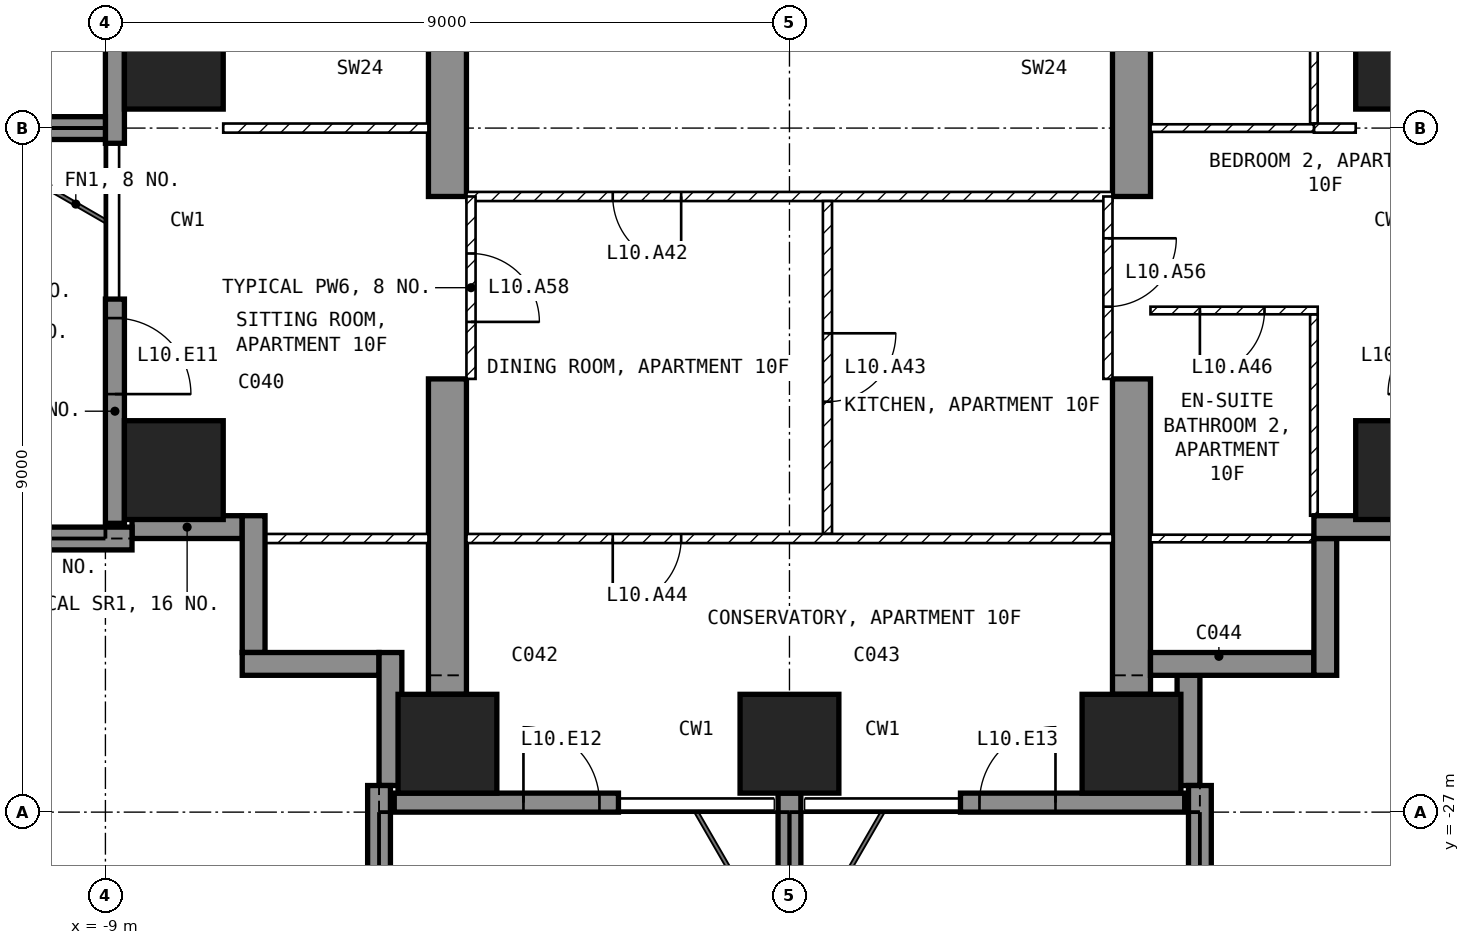
"""IFC4 building model, lengths in metres.
Left out: names, types, materials, properties, quantities, classifications, styles, units other than length and angle.
Written with IfcOpenShell. Run it as: python <this file> out.ifc"""

import sys

from ifc_helpers import new_model, si_unit, direction, frame, frame_2d, origin, origin_2d, place, context, subcontext, project, spatial, polyline, rectangle, outline, extrude, element, fill, save


model = new_model("IFC4")
c1 = context("Model", 3, precision=1e-05, world=origin(), true_north=direction((0.0, 1.0)))
c2 = subcontext(c1, "Body", "Model", "MODEL_VIEW")
j1 = project(units=[si_unit("LENGTHUNIT", "METRE"), si_unit("PLANEANGLEUNIT", "RADIAN")], contexts=[c1])
p1 = place(None, origin())
s1 = spatial("IfcSite", under=j1, at=p1, CompositionType="ELEMENT")
p2 = place(p1, origin())
s2 = spatial("IfcBuilding", under=s1, at=p2, CompositionType="ELEMENT")
p3 = place(p2, frame((0.0, 0.0, 54.0)))
s3 = spatial("IfcBuildingStorey", under=s2, at=p3, CompositionType="ELEMENT", Elevation=54.0)
for number, where, z_axis, x_axis in (
    (1, (-8.1, -22.5, -0.25), (0.0, 0.0, 1.0), (1.0, 0.0, 0.0)),
    (2, (-8.1, -17.1, -0.25), (0.0, 0.0, 1.0), (1.0, 0.0, 0.0)),
    (3, (-4.5, -26.1, -0.25), (0.0, 0.0, 1.0), (1.0, 0.0, 0.0)),
    (4, (0.0, -26.1, -0.25), (0.0, 0.0, 1.0), (1.0, 0.0, 0.0)),
    (5, (4.5, -26.1, -0.25), (0.0, 0.0, 1.0), (1.0, 0.0, 0.0)),
    (6, (8.1, -22.5, -0.25), (0.0, 0.0, 1.0), (1.0, 0.0, 0.0)),
    (7, (8.1, -17.1, -0.25), (0.0, 0.0, 1.0), (1.0, 0.0, 0.0)),
):
    element("IfcColumn", number, at=place(p3, frame(where, z_axis=z_axis, x_axis=x_axis)), inside=s3, PredefinedType="COLUMN", context=c2, shape_type="SweptSolid", body=[
        extrude(rectangle(XDim=1.3, YDim=1.3, at=origin_2d()), origin(), (0.0, 0.0, 1.0), 3.5),
    ])
for number, where, z_axis, x_axis in (
    (8, (-4.75, -25.45, -0.25), (1.0, 0.0, 0.0), (0.0, 1.0, 0.0)),
    (9, (4.25, -25.45, -0.25), (1.0, 0.0, 0.0), (0.0, 1.0, 0.0)),
):
    element("IfcWall", number, at=place(p3, frame(where, z_axis=z_axis, x_axis=x_axis)), inside=s3, PredefinedType="SHEAR", context=c2, shape_type="SweptSolid", body=[
        extrude(outline(polyline([(0.0, 0.0), (4.15, 0.0), (4.15, 2.65), (6.55, 2.65), (6.55, 0.0), (11.95, 0.0), (11.95, 2.65), (14.35, 2.65), (14.35, 0.0), (16.45, 0.0), (16.45, 3.5), (0.0, 3.5), (0.0, 0.0)])), origin(), (0.0, 0.0, 1.0), 0.5),
    ])
p4 = place(p3, frame((-8.875, -14.65, 0.0), z_axis=(0.0, 0.0, 1.0), x_axis=(0.0, -1.0, 0.0)))
e10 = element("IfcWall", 10, at=p4, inside=s3, PredefinedType="SOLIDWALL", context=c2, shape_type="SweptSolid", body=[
    extrude(rectangle(XDim=3.55, YDim=0.25, at=frame_2d((1.775, 0.0))), origin(), (0.0, 0.0, 1.0), 3.25),
])
p5 = place(p4, frame((0.25, 0.0, 0.0)))
e11 = element("IfcOpeningElement", 11, at=p5, cuts=e10, PredefinedType="OPENING", context=c2, shape_type="SweptSolid", body=[
    extrude(rectangle(XDim=1.2, YDim=2.4, at=frame_2d((0.6, 1.2))), frame((0.0, 0.135, 0.0), z_axis=(0.0, -1.0, 0.0), x_axis=(1.0, 0.0, 0.0)), (0.0, 0.0, 1.0), 0.27),
])
p6 = place(p3, frame((-8.875, -20.25, 0.0), z_axis=(0.0, 0.0, 1.0), x_axis=(0.0, -1.0, 0.0)))
e12 = element("IfcWall", 12, at=p6, inside=s3, PredefinedType="SOLIDWALL", context=c2, shape_type="SweptSolid", body=[
    extrude(rectangle(XDim=2.95, YDim=0.25, at=frame_2d((1.475, 0.0))), origin(), (0.0, 0.0, 1.0), 3.25),
])
p7 = place(p6, frame((0.25, 0.0, 0.0)))
e13 = element("IfcOpeningElement", 13, at=p7, cuts=e12, PredefinedType="OPENING", context=c2, shape_type="SweptSolid", body=[
    extrude(rectangle(XDim=1.0, YDim=2.4, at=frame_2d((0.5, 1.2))), frame((0.0, 0.135, 0.0), z_axis=(0.0, -1.0, 0.0), x_axis=(1.0, 0.0, 0.0)), (0.0, 0.0, 1.0), 0.27),
])
p8 = place(p3, frame((-5.2, -26.875, 0.0), z_axis=(0.0, 0.0, 1.0), x_axis=(1.0, 0.0, 0.0)))
e14 = element("IfcWall", 14, at=p8, inside=s3, PredefinedType="SOLIDWALL", context=c2, shape_type="SweptSolid", body=[
    extrude(rectangle(XDim=2.95, YDim=0.25, at=frame_2d((1.475, 0.0))), origin(), (0.0, 0.0, 1.0), 3.25),
])
p9 = place(p8, frame((1.7, 0.0, 0.0)))
e15 = element("IfcOpeningElement", 15, at=p9, cuts=e14, PredefinedType="OPENING", context=c2, shape_type="SweptSolid", body=[
    extrude(rectangle(XDim=1.0, YDim=2.4, at=frame_2d((0.5, 1.2))), frame((0.0, 0.135, 0.0), z_axis=(0.0, -1.0, 0.0), x_axis=(1.0, 0.0, 0.0)), (0.0, 0.0, 1.0), 0.27),
])
p10 = place(p3, frame((2.25, -26.875, 0.0), z_axis=(0.0, 0.0, 1.0), x_axis=(1.0, 0.0, 0.0)))
e16 = element("IfcWall", 16, at=p10, inside=s3, PredefinedType="SOLIDWALL", context=c2, shape_type="SweptSolid", body=[
    extrude(rectangle(XDim=2.95, YDim=0.25, at=frame_2d((1.475, 0.0))), origin(), (0.0, 0.0, 1.0), 3.25),
])
p11 = place(p10, frame((0.25, 0.0, 0.0)))
e17 = element("IfcOpeningElement", 17, at=p11, cuts=e16, PredefinedType="OPENING", context=c2, shape_type="SweptSolid", body=[
    extrude(rectangle(XDim=1.0, YDim=2.4, at=frame_2d((0.5, 1.2))), frame((0.0, 0.135, 0.0), z_axis=(0.0, -1.0, 0.0), x_axis=(1.0, 0.0, 0.0)), (0.0, 0.0, 1.0), 0.27),
])
p12 = place(p3, frame((5.25, -26.65, 0.0), z_axis=(0.0, 0.0, 1.0), x_axis=(0.0, 1.0, 0.0)))
e18 = element("IfcWall", 18, at=p12, inside=s3, PredefinedType="SOLIDWALL", context=c2, shape_type="SweptSolid", body=[
    extrude(rectangle(XDim=1.45, YDim=0.3, at=frame_2d((0.725, 0.0))), origin(), (0.0, 0.0, 1.0), 3.25),
])
p13 = place(p3, frame((4.75, -25.05, 0.0), z_axis=(0.0, 0.0, 1.0), x_axis=(1.0, 0.0, 0.0)))
e19 = element("IfcWall", 19, at=p13, inside=s3, PredefinedType="SOLIDWALL", context=c2, shape_type="SweptSolid", body=[
    extrude(rectangle(XDim=2.15, YDim=0.3, at=frame_2d((1.075, 0.0))), origin(), (0.0, 0.0, 1.0), 3.25),
])
p14 = place(p3, frame((7.05, -25.2, 0.0), z_axis=(0.0, 0.0, 1.0), x_axis=(0.0, 1.0, 0.0)))
e20 = element("IfcWall", 20, at=p14, inside=s3, PredefinedType="SOLIDWALL", context=c2, shape_type="SweptSolid", body=[
    extrude(rectangle(XDim=1.8, YDim=0.3, at=frame_2d((0.9, 0.0))), origin(), (0.0, 0.0, 1.0), 3.25),
])
p15 = place(p3, frame((6.9, -23.25, 0.0), z_axis=(0.0, 0.0, 1.0), x_axis=(1.0, 0.0, 0.0)))
e21 = element("IfcWall", 21, at=p15, inside=s3, PredefinedType="SOLIDWALL", context=c2, shape_type="SweptSolid", body=[
    extrude(rectangle(XDim=1.75, YDim=0.3, at=frame_2d((0.875, 0.0))), origin(), (0.0, 0.0, 1.0), 3.25),
])
p16 = place(p3, frame((-8.65, -23.25, 0.0), z_axis=(0.0, 0.0, 1.0), x_axis=(1.0, 0.0, 0.0)))
e22 = element("IfcWall", 22, at=p16, inside=s3, PredefinedType="SOLIDWALL", context=c2, shape_type="SweptSolid", body=[
    extrude(rectangle(XDim=1.45, YDim=0.3, at=frame_2d((0.725, 0.0))), origin(), (0.0, 0.0, 1.0), 3.25),
])
p17 = place(p3, frame((-7.05, -23.1, 0.0), z_axis=(0.0, 0.0, 1.0), x_axis=(0.0, -1.0, 0.0)))
e23 = element("IfcWall", 23, at=p17, inside=s3, PredefinedType="SOLIDWALL", context=c2, shape_type="SweptSolid", body=[
    extrude(rectangle(XDim=1.8, YDim=0.3, at=frame_2d((0.9, 0.0))), origin(), (0.0, 0.0, 1.0), 3.25),
])
p18 = place(p3, frame((-7.2, -25.05, 0.0), z_axis=(0.0, 0.0, 1.0), x_axis=(1.0, 0.0, 0.0)))
e24 = element("IfcWall", 24, at=p18, inside=s3, PredefinedType="SOLIDWALL", context=c2, shape_type="SweptSolid", body=[
    extrude(rectangle(XDim=1.8, YDim=0.3, at=frame_2d((0.9, 0.0))), origin(), (0.0, 0.0, 1.0), 3.25),
])
p19 = place(p3, frame((-5.25, -24.9, 0.0), z_axis=(0.0, 0.0, 1.0), x_axis=(0.0, -1.0, 0.0)))
e25 = element("IfcWall", 25, at=p19, inside=s3, PredefinedType="SOLIDWALL", context=c2, shape_type="SweptSolid", body=[
    extrude(rectangle(XDim=1.75, YDim=0.3, at=frame_2d((0.875, 0.0))), origin(), (0.0, 0.0, 1.0), 3.25),
])
p20 = place(p3, frame((-8.65, -23.4, 0.0), z_axis=(0.0, 0.0, 1.0), x_axis=(-1.0, 0.0, 0.0)))
e26 = element("IfcWall", 26, at=p20, inside=s3, PredefinedType="SOLIDWALL", context=c2, shape_type="SweptSolid", body=[
    extrude(rectangle(XDim=3.05, YDim=0.3, at=frame_2d((1.525, 0.0))), origin(), (0.0, 0.0, 1.0), 3.25),
])
p21 = place(p3, frame((-9.0, -18.0, 0.0), z_axis=(0.0, 0.0, 1.0), x_axis=(-1.0, 0.0, 0.0)))
e27 = element("IfcWall", 27, at=p21, inside=s3, PredefinedType="SOLIDWALL", context=c2, shape_type="SweptSolid", body=[
    extrude(rectangle(XDim=2.7, YDim=0.3, at=frame_2d((1.35, 0.0))), origin(), (0.0, 0.0, 1.0), 3.25),
])
p22 = place(p3, frame((-5.4, -26.65, 0.0), z_axis=(0.0, 0.0, 1.0), x_axis=(0.0, -1.0, 0.0)))
e28 = element("IfcWall", 28, at=p22, inside=s3, PredefinedType="SOLIDWALL", context=c2, shape_type="SweptSolid", body=[
    extrude(rectangle(XDim=3.05, YDim=0.3, at=frame_2d((1.525, 0.0))), origin(), (0.0, 0.0, 1.0), 3.25),
])
p23 = place(p3, frame((0.0, -26.75, 0.0), z_axis=(0.0, 0.0, 1.0), x_axis=(0.0, -1.0, 0.0)))
e29 = element("IfcWall", 29, at=p23, inside=s3, PredefinedType="SOLIDWALL", context=c2, shape_type="SweptSolid", body=[
    extrude(rectangle(XDim=2.95, YDim=0.3, at=frame_2d((1.475, 0.0))), origin(), (0.0, 0.0, 1.0), 3.25),
])
p24 = place(p3, frame((5.4, -26.65, 0.0), z_axis=(0.0, 0.0, 1.0), x_axis=(0.0, -1.0, 0.0)))
e30 = element("IfcWall", 30, at=p24, inside=s3, PredefinedType="SOLIDWALL", context=c2, shape_type="SweptSolid", body=[
    extrude(rectangle(XDim=3.05, YDim=0.3, at=frame_2d((1.525, 0.0))), origin(), (0.0, 0.0, 1.0), 3.25),
])
p25 = place(p3, frame((4.25, -18.9, 0.0), z_axis=(0.0, 0.0, 1.0), x_axis=(-1.0, 0.0, 0.0)))
e31 = element("IfcWall", 31, at=p25, inside=s3, PredefinedType="PARTITIONING", context=c2, shape_type="SweptSolid", body=[
    extrude(rectangle(XDim=8.5, YDim=0.12, at=frame_2d((4.25, 0.0))), origin(), (0.0, 0.0, 1.0), 3.25),
])
p26 = place(p25, frame((5.675, 0.0, 0.0)))
e32 = element("IfcOpeningElement", 32, at=p26, cuts=e31, PredefinedType="OPENING", context=c2, shape_type="SweptSolid", body=[
    extrude(rectangle(XDim=0.9, YDim=2.1, at=frame_2d((0.45, 1.05))), frame((0.0, 0.07, 0.0), z_axis=(0.0, -1.0, 0.0), x_axis=(1.0, 0.0, 0.0)), (0.0, 0.0, 1.0), 0.14),
])
p27 = place(p3, frame((0.5, -18.96, 0.0), z_axis=(0.0, 0.0, 1.0), x_axis=(0.0, -1.0, 0.0)))
e33 = element("IfcWall", 33, at=p27, inside=s3, PredefinedType="PARTITIONING", context=c2, shape_type="SweptSolid", body=[
    extrude(rectangle(XDim=4.38, YDim=0.12, at=frame_2d((2.19, 0.0))), origin(), (0.0, 0.0, 1.0), 3.25),
])
p28 = place(p27, frame((1.74, 0.0, 0.0)))
e34 = element("IfcOpeningElement", 34, at=p28, cuts=e33, PredefinedType="OPENING", context=c2, shape_type="SweptSolid", body=[
    extrude(rectangle(XDim=0.9, YDim=2.1, at=frame_2d((0.45, 1.05))), frame((0.0, 0.07, 0.0), z_axis=(0.0, -1.0, 0.0), x_axis=(1.0, 0.0, 0.0)), (0.0, 0.0, 1.0), 0.14),
])
p29 = place(p3, frame((4.25, -23.4, 0.0), z_axis=(0.0, 0.0, 1.0), x_axis=(-1.0, 0.0, 0.0)))
e35 = element("IfcWall", 35, at=p29, inside=s3, PredefinedType="PARTITIONING", context=c2, shape_type="SweptSolid", body=[
    extrude(rectangle(XDim=8.5, YDim=0.12, at=frame_2d((4.25, 0.0))), origin(), (0.0, 0.0, 1.0), 3.25),
])
p30 = place(p29, frame((5.675, 0.0, 0.0)))
e36 = element("IfcOpeningElement", 36, at=p30, cuts=e35, PredefinedType="OPENING", context=c2, shape_type="SweptSolid", body=[
    extrude(rectangle(XDim=0.9, YDim=2.1, at=frame_2d((0.45, 1.05))), frame((0.0, 0.07, 0.0), z_axis=(0.0, -1.0, 0.0), x_axis=(1.0, 0.0, 0.0)), (0.0, 0.0, 1.0), 0.14),
])
p31 = place(p3, frame((6.9, -17.94, 0.0), z_axis=(0.0, 0.0, 1.0), x_axis=(0.0, 1.0, 0.0)))
e37 = element("IfcWall", 37, at=p31, inside=s3, PredefinedType="PARTITIONING", context=c2, shape_type="SweptSolid", body=[
    extrude(rectangle(XDim=3.49, YDim=0.1, at=frame_2d((1.745, 0.0))), origin(), (0.0, 0.0, 1.0), 3.25),
])
p32 = place(p3, frame((7.45, -18.0, 0.0), z_axis=(0.0, 0.0, 1.0), x_axis=(-1.0, 0.0, 0.0)))
e38 = element("IfcWall", 38, at=p32, inside=s3, PredefinedType="PARTITIONING", context=c2, shape_type="SweptSolid", body=[
    extrude(rectangle(XDim=0.55, YDim=0.12, at=frame_2d((0.275, 0.0))), origin(), (0.0, 0.0, 1.0), 3.25),
])
p33 = place(p3, frame((6.9, -18.0, 0.0), z_axis=(0.0, 0.0, 1.0), x_axis=(-1.0, 0.0, 0.0)))
e39 = element("IfcWall", 39, at=p33, inside=s3, PredefinedType="PARTITIONING", context=c2, shape_type="SweptSolid", body=[
    extrude(rectangle(XDim=2.15, YDim=0.1, at=frame_2d((1.075, 0.0))), origin(), (0.0, 0.0, 1.0), 3.25),
])
p34 = place(p3, frame((6.9, -23.1, 0.0), z_axis=(0.0, 0.0, 1.0), x_axis=(0.0, 1.0, 0.0)))
e40 = element("IfcWall", 40, at=p34, inside=s3, PredefinedType="PARTITIONING", context=c2, shape_type="SweptSolid", body=[
    extrude(rectangle(XDim=2.65, YDim=0.1, at=frame_2d((1.325, 0.0))), origin(), (0.0, 0.0, 1.0), 3.25),
])
p35 = place(p3, frame((6.95, -20.4, 0.0), z_axis=(0.0, 0.0, 1.0), x_axis=(-1.0, 0.0, 0.0)))
e41 = element("IfcWall", 41, at=p35, inside=s3, PredefinedType="PARTITIONING", context=c2, shape_type="SweptSolid", body=[
    extrude(rectangle(XDim=2.2, YDim=0.1, at=frame_2d((1.1, 0.0))), origin(), (0.0, 0.0, 1.0), 3.25),
])
p36 = place(p35, frame((0.7, 0.0, 0.0)))
e42 = element("IfcOpeningElement", 42, at=p36, cuts=e41, PredefinedType="OPENING", context=c2, shape_type="SweptSolid", body=[
    extrude(rectangle(XDim=0.85, YDim=2.1, at=frame_2d((0.425, 1.05))), frame((0.0, 0.06, 0.0), z_axis=(0.0, -1.0, 0.0), x_axis=(1.0, 0.0, 0.0)), (0.0, 0.0, 1.0), 0.12),
])
p37 = place(p3, frame((7.12, -23.4, 0.0), z_axis=(0.0, 0.0, 1.0), x_axis=(-1.0, 0.0, 0.0)))
e43 = element("IfcWall", 43, at=p37, inside=s3, PredefinedType="PARTITIONING", context=c2, shape_type="SweptSolid", body=[
    extrude(rectangle(XDim=2.37, YDim=0.1, at=frame_2d((1.185, 0.0))), origin(), (0.0, 0.0, 1.0), 3.25),
])
p38 = place(p3, frame((-4.75, -18.0, 0.0), z_axis=(0.0, 0.0, 1.0), x_axis=(-1.0, 0.0, 0.0)))
e44 = element("IfcWall", 44, at=p38, inside=s3, PredefinedType="PARTITIONING", context=c2, shape_type="SweptSolid", body=[
    extrude(rectangle(XDim=2.7, YDim=0.12, at=frame_2d((1.35, 0.0))), origin(), (0.0, 0.0, 1.0), 3.25),
])
p39 = place(p3, frame((-4.75, -23.4, 0.0), z_axis=(0.0, 0.0, 1.0), x_axis=(-1.0, 0.0, 0.0)))
e45 = element("IfcWall", 45, at=p39, inside=s3, PredefinedType="PARTITIONING", context=c2, shape_type="SweptSolid", body=[
    extrude(rectangle(XDim=2.37, YDim=0.12, at=frame_2d((1.185, 0.0))), origin(), (0.0, 0.0, 1.0), 3.25),
])
p40 = place(p3, frame((4.19, -18.9, 0.0), z_axis=(0.0, 0.0, 1.0), x_axis=(0.0, -1.0, 0.0)))
e46 = element("IfcWall", 46, at=p40, inside=s3, PredefinedType="PARTITIONING", context=c2, shape_type="SweptSolid", body=[
    extrude(rectangle(XDim=2.4, YDim=0.12, at=frame_2d((1.2, 0.0))), origin(), (0.0, 0.0, 1.0), 2.4),
])
p41 = place(p40, frame((0.55, 0.0, 0.0)))
e47 = element("IfcOpeningElement", 47, at=p41, cuts=e46, PredefinedType="OPENING", context=c2, shape_type="SweptSolid", body=[
    extrude(rectangle(XDim=0.9, YDim=2.1, at=frame_2d((0.45, 1.05))), frame((0.0, 0.07, 0.0), z_axis=(0.0, -1.0, 0.0), x_axis=(1.0, 0.0, 0.0)), (0.0, 0.0, 1.0), 0.14),
])
p42 = place(p3, frame((-4.19, -18.9, 0.0), z_axis=(0.0, 0.0, 1.0), x_axis=(0.0, -1.0, 0.0)))
e48 = element("IfcWall", 48, at=p42, inside=s3, PredefinedType="PARTITIONING", context=c2, shape_type="SweptSolid", body=[
    extrude(rectangle(XDim=2.4, YDim=0.12, at=frame_2d((1.2, 0.0))), origin(), (0.0, 0.0, 1.0), 2.4),
])
p43 = place(p42, frame((0.75, 0.0, 0.0)))
e49 = element("IfcOpeningElement", 49, at=p43, cuts=e48, PredefinedType="OPENING", context=c2, shape_type="SweptSolid", body=[
    extrude(rectangle(XDim=0.9, YDim=2.1, at=frame_2d((0.45, 1.05))), frame((0.0, 0.07, 0.0), z_axis=(0.0, -1.0, 0.0), x_axis=(1.0, 0.0, 0.0)), (0.0, 0.0, 1.0), 0.14),
])
p44 = place(p7, origin())
e50 = element("IfcDoor", 50, at=p44, inside=s3, OperationType="SINGLE_SWING_RIGHT", PredefinedType="DOOR", context=c2, shape_type="SweptSolid", body=[
    extrude(rectangle(XDim=1.0, YDim=2.4, at=frame_2d((0.5, 1.2))), frame((0.0, 0.025, 0.0), z_axis=(0.0, -1.0, 0.0), x_axis=(1.0, 0.0, 0.0)), (0.0, 0.0, 1.0), 0.05),
])
fill(e13, e50)
p45 = place(p9, origin())
e51 = element("IfcDoor", 51, at=p45, inside=s3, OperationType="SINGLE_SWING_LEFT", PredefinedType="DOOR", context=c2, shape_type="SweptSolid", body=[
    extrude(rectangle(XDim=1.0, YDim=2.4, at=frame_2d((0.5, 1.2))), frame((0.0, 0.025, 0.0), z_axis=(0.0, -1.0, 0.0), x_axis=(1.0, 0.0, 0.0)), (0.0, 0.0, 1.0), 0.05),
])
fill(e15, e51)
p46 = place(p11, origin())
e52 = element("IfcDoor", 52, at=p46, inside=s3, OperationType="SINGLE_SWING_RIGHT", PredefinedType="DOOR", context=c2, shape_type="SweptSolid", body=[
    extrude(rectangle(XDim=1.0, YDim=2.4, at=frame_2d((0.5, 1.2))), frame((0.0, 0.025, 0.0), z_axis=(0.0, -1.0, 0.0), x_axis=(1.0, 0.0, 0.0)), (0.0, 0.0, 1.0), 0.05),
])
fill(e17, e52)
p47 = place(p26, origin())
e53 = element("IfcDoor", 53, at=p47, inside=s3, OperationType="SINGLE_SWING_LEFT", PredefinedType="DOOR", context=c2, shape_type="SweptSolid", body=[
    extrude(rectangle(XDim=0.9, YDim=2.1, at=frame_2d((0.45, 1.05))), frame((0.0, 0.025, 0.0), z_axis=(0.0, -1.0, 0.0), x_axis=(1.0, 0.0, 0.0)), (0.0, 0.0, 1.0), 0.05),
])
fill(e32, e53)
p48 = place(p28, origin())
e54 = element("IfcDoor", 54, at=p48, inside=s3, OperationType="SINGLE_SWING_LEFT", PredefinedType="DOOR", context=c2, shape_type="SweptSolid", body=[
    extrude(rectangle(XDim=0.9, YDim=2.1, at=frame_2d((0.45, 1.05))), frame((0.0, 0.025, 0.0), z_axis=(0.0, -1.0, 0.0), x_axis=(1.0, 0.0, 0.0)), (0.0, 0.0, 1.0), 0.05),
])
fill(e34, e54)
p49 = place(p30, origin())
e55 = element("IfcDoor", 55, at=p49, inside=s3, OperationType="SINGLE_SWING_RIGHT", PredefinedType="DOOR", context=c2, shape_type="SweptSolid", body=[
    extrude(rectangle(XDim=0.9, YDim=2.1, at=frame_2d((0.45, 1.05))), frame((0.0, 0.025, 0.0), z_axis=(0.0, -1.0, 0.0), x_axis=(1.0, 0.0, 0.0)), (0.0, 0.0, 1.0), 0.05),
])
fill(e36, e55)
p50 = place(p36, origin())
e56 = element("IfcDoor", 56, at=p50, inside=s3, OperationType="SINGLE_SWING_RIGHT", PredefinedType="DOOR", context=c2, shape_type="SweptSolid", body=[
    extrude(rectangle(XDim=0.85, YDim=2.1, at=frame_2d((0.425, 1.05))), frame((0.0, 0.025, 0.0), z_axis=(0.0, -1.0, 0.0), x_axis=(1.0, 0.0, 0.0)), (0.0, 0.0, 1.0), 0.05),
])
fill(e42, e56)
p51 = place(p41, origin())
e57 = element("IfcDoor", 57, at=p51, inside=s3, OperationType="SINGLE_SWING_LEFT", PredefinedType="DOOR", context=c2, shape_type="SweptSolid", body=[
    extrude(rectangle(XDim=0.9, YDim=2.1, at=frame_2d((0.45, 1.05))), frame((0.0, 0.025, 0.0), z_axis=(0.0, -1.0, 0.0), x_axis=(1.0, 0.0, 0.0)), (0.0, 0.0, 1.0), 0.05),
])
fill(e47, e57)
p52 = place(p43, origin())
e58 = element("IfcDoor", 58, at=p52, inside=s3, OperationType="SINGLE_SWING_RIGHT", PredefinedType="DOOR", context=c2, shape_type="SweptSolid", body=[
    extrude(rectangle(XDim=0.9, YDim=2.1, at=frame_2d((0.45, 1.05))), frame((0.0, 0.025, 0.0), z_axis=(0.0, -1.0, 0.0), x_axis=(1.0, 0.0, 0.0)), (0.0, 0.0, 1.0), 0.05),
])
fill(e49, e58)
save(model, sys.argv[1])
